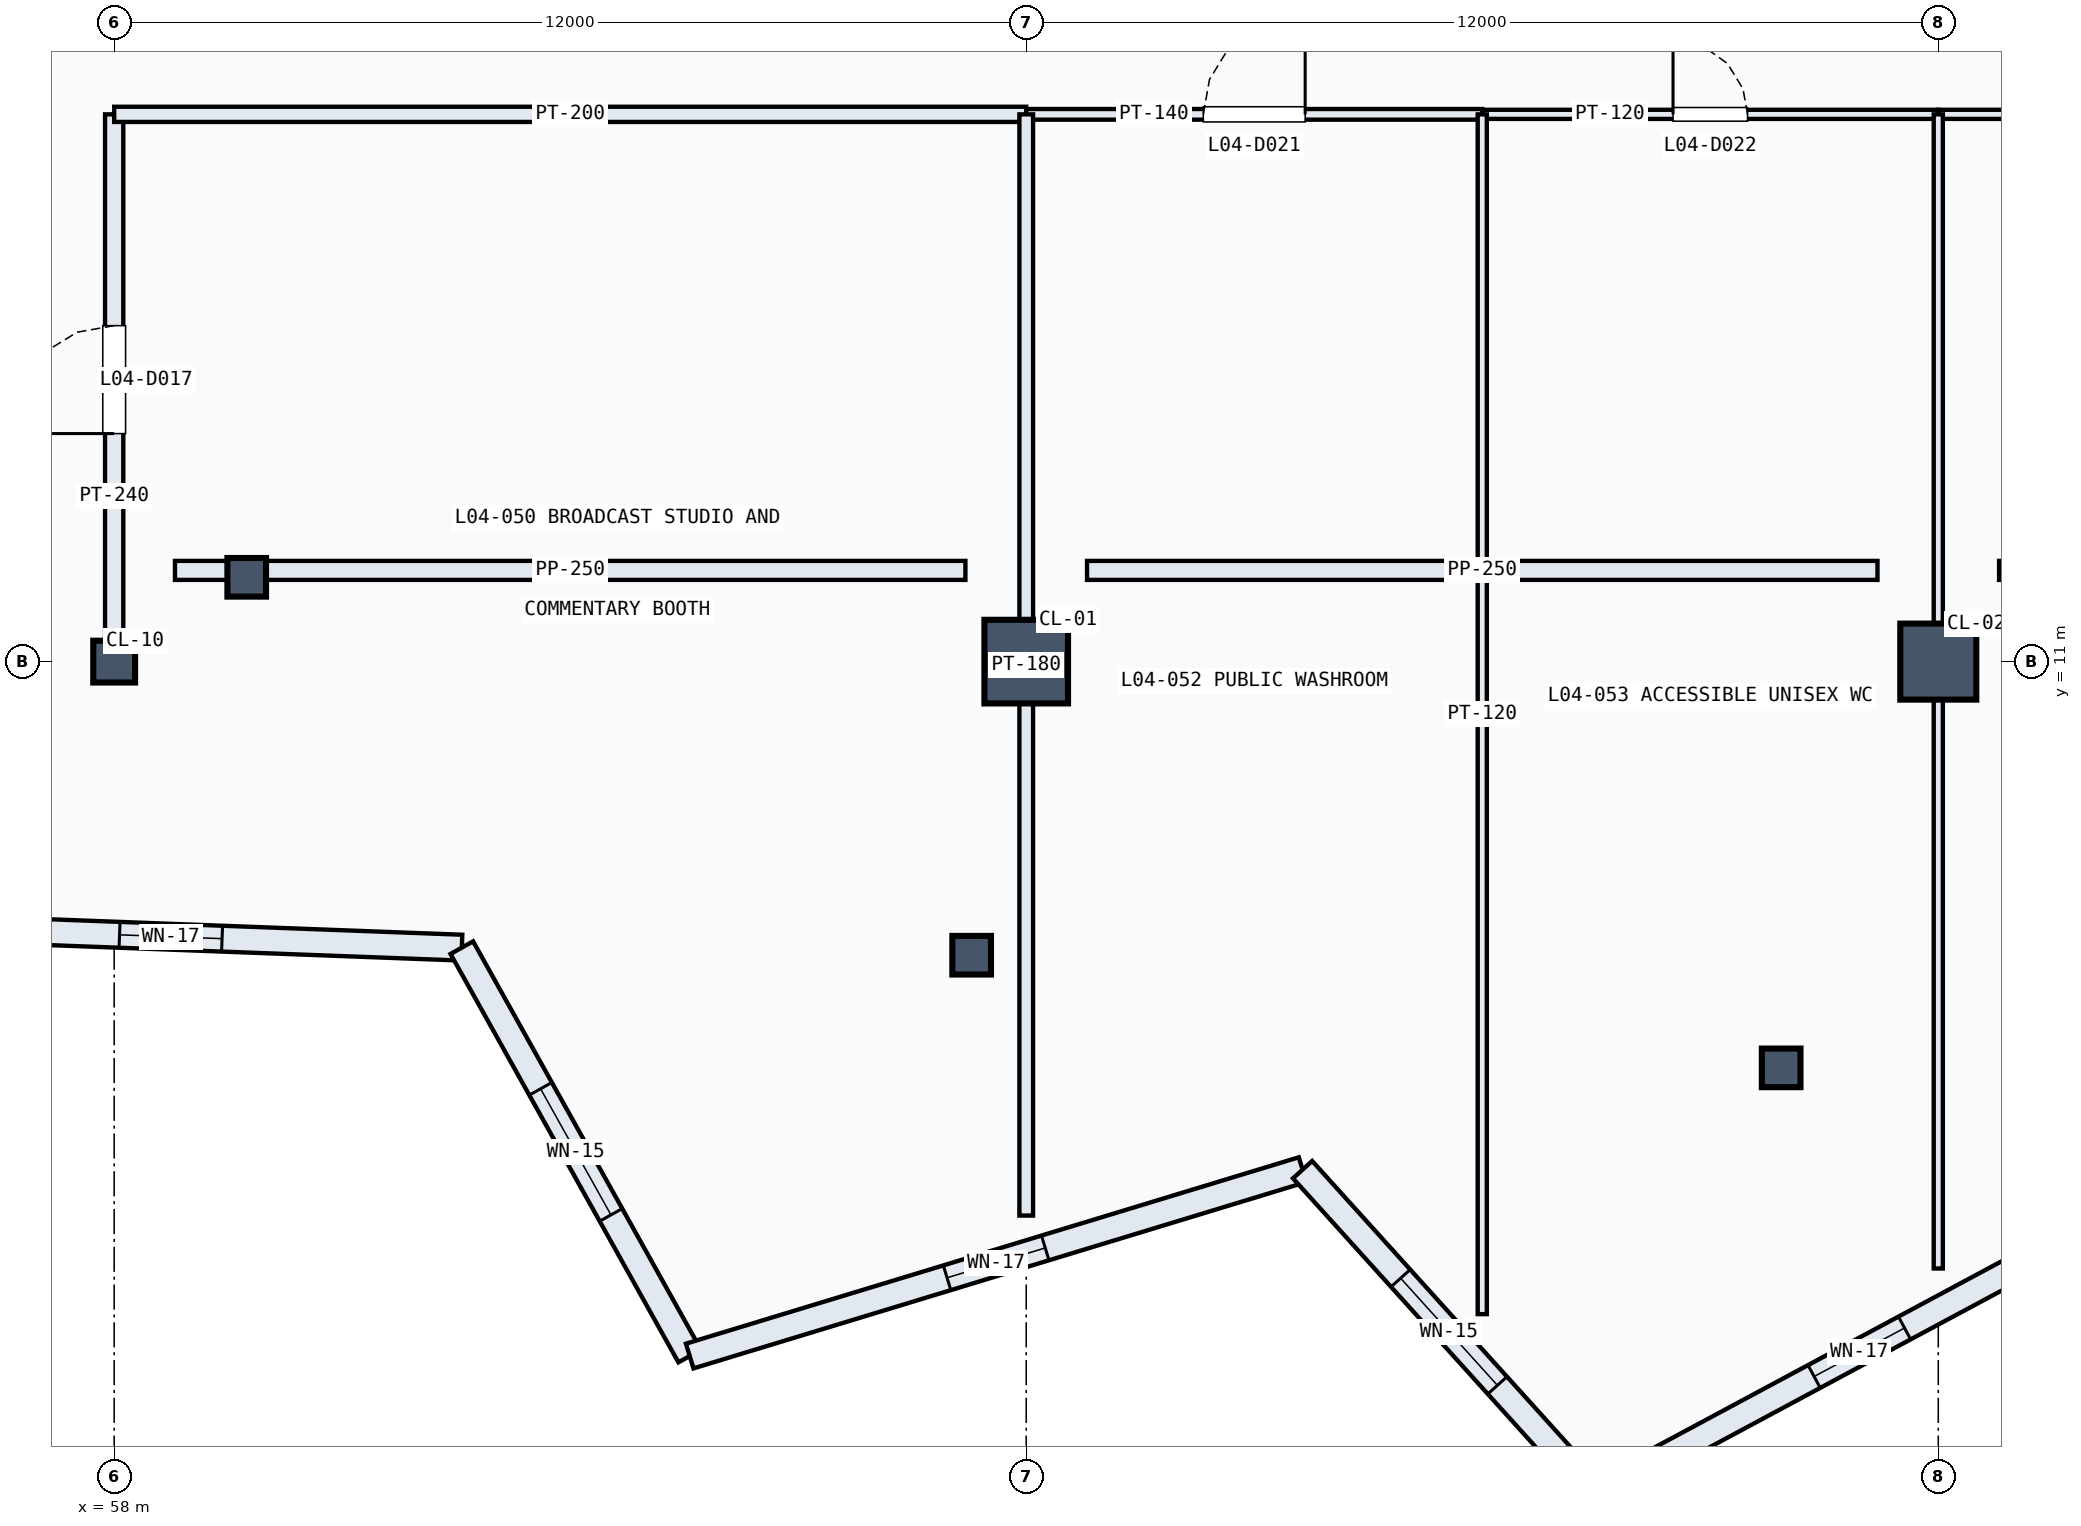
"""IFC4 building model, lengths in metres.
Left out: names, types, materials, properties, quantities, classifications, styles, units other than length and angle.
Written with IfcOpenShell. Run it as: python <this file> out.ifc"""

import sys

from ifc_helpers import new_model, si_unit, direction, frame, frame_2d, origin, origin_2d, place, context, subcontext, project, spatial, rectangle, hollow_circle, extrude, element, fill, save


model = new_model("IFC4")
c1 = context("Model", 3, precision=1e-05, world=origin(), true_north=direction((0.0, 1.0)))
c2 = subcontext(c1, "Body", "Model", "MODEL_VIEW")
j1 = project(units=[si_unit("LENGTHUNIT", "METRE"), si_unit("PLANEANGLEUNIT", "RADIAN")], contexts=[c1])
p1 = place(None, origin())
s1 = spatial("IfcSite", under=j1, at=p1, CompositionType="ELEMENT")
p2 = place(p1, origin())
s2 = spatial("IfcBuilding", under=s1, at=p2, CompositionType="ELEMENT")
p3 = place(p2, frame((0.0, 0.0, 19.5)))
s3 = spatial("IfcBuildingStorey", under=s2, at=p3, CompositionType="ELEMENT", Elevation=19.5)
p4 = place(p3, frame((58.0, 11.0, 0.0), z_axis=(0.0, 0.0, 1.0), x_axis=(1.0, 0.0, 0.0)))
e1 = element("IfcColumn", 1, at=p4, inside=s3, PredefinedType="COLUMN", context=c2, shape_type="SweptSolid", body=[
    extrude(rectangle(XDim=0.55, YDim=0.55, at=origin_2d()), origin(), (0.0, 0.0, 1.0), 4.8),
])
p5 = place(p3, frame((70.0, 11.0, 0.0), z_axis=(0.0, 0.0, 1.0), x_axis=(1.0, 0.0, 0.0)))
e2 = element("IfcColumn", 2, at=p5, inside=s3, PredefinedType="COLUMN", context=c2, shape_type="SweptSolid", body=[
    extrude(rectangle(XDim=1.1, YDim=1.1, at=origin_2d()), origin(), (0.0, 0.0, 1.0), 4.8),
])
p6 = place(p3, frame((82.0, 11.0, 0.0), z_axis=(0.0, 0.0, 1.0), x_axis=(1.0, 0.0, 0.0)))
e3 = element("IfcColumn", 3, at=p6, inside=s3, PredefinedType="COLUMN", context=c2, shape_type="SweptSolid", body=[
    extrude(rectangle(XDim=1.0, YDim=1.0, at=origin_2d()), origin(), (0.0, 0.0, 1.0), 4.8),
])
for number, where, z_axis, x_axis in (
    (4, (59.744, 12.109, 0.0), (0.0, 0.0, 1.0), (1.0, 0.0, 0.0)),
    (5, (69.282, 7.137, 0.0), (0.0, 0.0, 1.0), (1.0, 0.0, 0.0)),
    (6, (79.933, 5.655, 0.0), (0.0, 0.0, 1.0), (1.0, 0.0, 0.0)),
):
    element("IfcColumn", number, at=place(p3, frame(where, z_axis=z_axis, x_axis=x_axis)), inside=s3, PredefinedType="COLUMN", context=c2, shape_type="SweptSolid", body=[
        extrude(hollow_circle(Radius=0.254, WallThickness=0.02, at=origin_2d()), origin(), (0.0, 0.0, 1.0), 4.8),
    ])
p7 = place(p3, frame((54.917, 7.524, 0.0), z_axis=(0.0, 0.0, 1.0), x_axis=(0.999297884119, -0.037466502319, 0.0)))
e7 = element("IfcWall", 7, at=p7, inside=s3, PredefinedType="USERDEFINED", context=c2, shape_type="SweptSolid", body=[
    extrude(rectangle(XDim=7.663, YDim=0.34, at=frame_2d((3.832, 0.0))), origin(), (0.0, 0.0, 1.0), 4.455),
])
p8 = place(p7, frame((3.156, 0.0, 0.8)))
e8 = element("IfcOpeningElement", 8, at=p8, cuts=e7, PredefinedType="OPENING", context=c2, shape_type="SweptSolid", body=[
    extrude(rectangle(XDim=1.35, YDim=2.1, at=frame_2d((0.675, 1.05))), frame((0.0, 0.18, 0.0), z_axis=(0.0, -1.0, 0.0), x_axis=(1.0, 0.0, 0.0)), (0.0, 0.0, 1.0), 0.36),
])
p9 = place(p3, frame((62.574, 7.237, 0.0), z_axis=(0.0, 0.0, 1.0), x_axis=(0.487306352228, -0.87323108, 0.0)))
e9 = element("IfcWall", 9, at=p9, inside=s3, PredefinedType="USERDEFINED", context=c2, shape_type="SweptSolid", body=[
    extrude(rectangle(XDim=6.153, YDim=0.34, at=frame_2d((3.076, 0.0))), origin(), (0.0, 0.0, 1.0), 4.455),
])
p10 = place(p9, frame((2.126, 0.0, 0.85)))
e10 = element("IfcOpeningElement", 10, at=p10, cuts=e9, PredefinedType="OPENING", context=c2, shape_type="SweptSolid", body=[
    extrude(rectangle(XDim=1.9, YDim=1.6, at=frame_2d((0.95, 0.8))), frame((0.0, 0.18, 0.0), z_axis=(0.0, -1.0, 0.0), x_axis=(1.0, 0.0, 0.0)), (0.0, 0.0, 1.0), 0.36),
])
p11 = place(p3, frame((65.573, 1.864, 0.0), z_axis=(0.0, 0.0, 1.0), x_axis=(0.956738407321, 0.290949514446, 0.0)))
e11 = element("IfcWall", 11, at=p11, inside=s3, PredefinedType="USERDEFINED", context=c2, shape_type="SweptSolid", body=[
    extrude(rectangle(XDim=8.428, YDim=0.34, at=frame_2d((4.214, 0.0))), origin(), (0.0, 0.0, 1.0), 4.455),
])
p12 = place(p11, frame((3.539, 0.0, 0.8)))
e12 = element("IfcOpeningElement", 12, at=p12, cuts=e11, PredefinedType="OPENING", context=c2, shape_type="SweptSolid", body=[
    extrude(rectangle(XDim=1.35, YDim=2.1, at=frame_2d((0.675, 1.05))), frame((0.0, 0.18, 0.0), z_axis=(0.0, -1.0, 0.0), x_axis=(1.0, 0.0, 0.0)), (0.0, 0.0, 1.0), 0.36),
])
p13 = place(p3, frame((73.636, 4.316, 0.0), z_axis=(0.0, 0.0, 1.0), x_axis=(0.670348131104, -0.742046752654, 0.0)))
e13 = element("IfcWall", 13, at=p13, inside=s3, PredefinedType="USERDEFINED", context=c2, shape_type="SweptSolid", body=[
    extrude(rectangle(XDim=5.748, YDim=0.34, at=frame_2d((2.874, 0.0))), origin(), (0.0, 0.0, 1.0), 4.455),
])
p14 = place(p13, frame((1.924, 0.0, 0.85)))
e14 = element("IfcOpeningElement", 14, at=p14, cuts=e13, PredefinedType="OPENING", context=c2, shape_type="SweptSolid", body=[
    extrude(rectangle(XDim=1.9, YDim=1.6, at=frame_2d((0.95, 0.8))), frame((0.0, 0.18, 0.0), z_axis=(0.0, -1.0, 0.0), x_axis=(1.0, 0.0, 0.0)), (0.0, 0.0, 1.0), 0.36),
])
p15 = place(p3, frame((77.489, 0.051, 0.0), z_axis=(0.0, 0.0, 1.0), x_axis=(0.881201188687, 0.472741435731, 0.0)))
e15 = element("IfcWall", 15, at=p15, inside=s3, PredefinedType="USERDEFINED", context=c2, shape_type="SweptSolid", body=[
    extrude(rectangle(XDim=7.881, YDim=0.34, at=frame_2d((3.94, 0.0))), origin(), (0.0, 0.0, 1.0), 4.455),
])
p16 = place(p15, frame((3.265, 0.0, 0.8)))
e16 = element("IfcOpeningElement", 16, at=p16, cuts=e15, PredefinedType="OPENING", context=c2, shape_type="SweptSolid", body=[
    extrude(rectangle(XDim=1.35, YDim=2.1, at=frame_2d((0.675, 1.05))), frame((0.0, 0.18, 0.0), z_axis=(0.0, -1.0, 0.0), x_axis=(1.0, 0.0, 0.0)), (0.0, 0.0, 1.0), 0.36),
])
for number, where, z_axis, x_axis in (
    (17, (58.8, 12.2, 0.0), (0.0, 0.0, 1.0), (1.0, 0.0, 0.0)),
    (18, (70.8, 12.2, 0.0), (0.0, 0.0, 1.0), (1.0, 0.0, 0.0)),
    (19, (82.8, 12.2, 0.0), (0.0, 0.0, 1.0), (1.0, 0.0, 0.0)),
):
    element("IfcWall", number, at=place(p3, frame(where, z_axis=z_axis, x_axis=x_axis)), inside=s3, PredefinedType="PARAPET", context=c2, shape_type="SweptSolid", body=[
        extrude(rectangle(XDim=10.4, YDim=0.25, at=frame_2d((5.2, 0.0))), origin(), (0.0, 0.0, 1.0), 0.8),
    ])
p17 = place(p3, frame((58.0, 11.22, 0.0), z_axis=(0.0, 0.0, 1.0), x_axis=(0.0, 1.0, 0.0)))
e20 = element("IfcWall", 20, at=p17, inside=s3, PredefinedType="PARTITIONING", context=c2, shape_type="SweptSolid", body=[
    extrude(rectangle(XDim=6.98, YDim=0.24, at=frame_2d((3.49, 0.0))), origin(), (0.0, 0.0, 1.0), 3.79),
])
p18 = place(p17, frame((2.78, 0.0, 0.0)))
e21 = element("IfcOpeningElement", 21, at=p18, cuts=e20, PredefinedType="OPENING", context=c2, shape_type="SweptSolid", body=[
    extrude(rectangle(XDim=1.42, YDim=2.25, at=frame_2d((0.71, 1.125))), frame((0.0, 0.13, 0.0), z_axis=(0.0, -1.0, 0.0), x_axis=(1.0, 0.0, 0.0)), (0.0, 0.0, 1.0), 0.26),
])
p19 = place(p3, frame((58.0, 18.2, 0.0), z_axis=(0.0, 0.0, 1.0), x_axis=(1.0, 0.0, 0.0)))
e22 = element("IfcWall", 22, at=p19, inside=s3, PredefinedType="PARTITIONING", context=c2, shape_type="SweptSolid", body=[
    extrude(rectangle(XDim=12.0, YDim=0.2, at=frame_2d((6.0, 0.0))), origin(), (0.0, 0.0, 1.0), 3.49),
])
p20 = place(p3, frame((70.0, 18.2, 0.0), z_axis=(0.0, 0.0, 1.0), x_axis=(1.0, 0.0, 0.0)))
e23 = element("IfcWall", 23, at=p20, inside=s3, PredefinedType="PARTITIONING", context=c2, shape_type="SweptSolid", body=[
    extrude(rectangle(XDim=6.0, YDim=0.14, at=frame_2d((3.0, 0.0))), origin(), (0.0, 0.0, 1.0), 3.49),
])
p21 = place(p20, frame((2.33, 0.0, 0.0)))
e24 = element("IfcOpeningElement", 24, at=p21, cuts=e23, PredefinedType="OPENING", context=c2, shape_type="SweptSolid", body=[
    extrude(rectangle(XDim=1.34, YDim=2.15, at=frame_2d((0.67, 1.075))), frame((0.0, 0.08, 0.0), z_axis=(0.0, -1.0, 0.0), x_axis=(1.0, 0.0, 0.0)), (0.0, 0.0, 1.0), 0.16),
])
p22 = place(p3, frame((76.0, 18.2, 0.0), z_axis=(0.0, 0.0, 1.0), x_axis=(1.0, 0.0, 0.0)))
e25 = element("IfcWall", 25, at=p22, inside=s3, PredefinedType="PARTITIONING", context=c2, shape_type="SweptSolid", body=[
    extrude(rectangle(XDim=6.0, YDim=0.12, at=frame_2d((3.0, 0.0))), origin(), (0.0, 0.0, 1.0), 3.64),
])
p23 = place(p22, frame((2.51, 0.0, 0.0)))
e26 = element("IfcOpeningElement", 26, at=p23, cuts=e25, PredefinedType="OPENING", context=c2, shape_type="SweptSolid", body=[
    extrude(rectangle(XDim=0.98, YDim=2.1, at=frame_2d((0.49, 1.05))), frame((0.0, 0.07, 0.0), z_axis=(0.0, -1.0, 0.0), x_axis=(1.0, 0.0, 0.0)), (0.0, 0.0, 1.0), 0.14),
])
p24 = place(p3, frame((82.0, 18.2, 0.0), z_axis=(0.0, 0.0, 1.0), x_axis=(1.0, 0.0, 0.0)))
e27 = element("IfcWall", 27, at=p24, inside=s3, PredefinedType="PARTITIONING", context=c2, shape_type="SweptSolid", body=[
    extrude(rectangle(XDim=12.0, YDim=0.12, at=frame_2d((6.0, 0.0))), origin(), (0.0, 0.0, 1.0), 3.64),
])
p25 = place(p24, frame((5.41, 0.0, 0.0)))
e28 = element("IfcOpeningElement", 28, at=p25, cuts=e27, PredefinedType="OPENING", context=c2, shape_type="SweptSolid", body=[
    extrude(rectangle(XDim=1.18, YDim=2.15, at=frame_2d((0.59, 1.075))), frame((0.0, 0.07, 0.0), z_axis=(0.0, -1.0, 0.0), x_axis=(1.0, 0.0, 0.0)), (0.0, 0.0, 1.0), 0.14),
])
p26 = place(p3, frame((70.0, 3.712, 0.0), z_axis=(0.0, 0.0, 1.0), x_axis=(0.0, 1.0, 0.0)))
e29 = element("IfcWall", 29, at=p26, inside=s3, PredefinedType="PARTITIONING", context=c2, shape_type="SweptSolid", body=[
    extrude(rectangle(XDim=14.488, YDim=0.18, at=frame_2d((7.244, 0.0))), origin(), (0.0, 0.0, 1.0), 3.49),
])
p27 = place(p3, frame((76.0, 2.415, 0.0), z_axis=(0.0, 0.0, 1.0), x_axis=(0.0, 1.0, 0.0)))
e30 = element("IfcWall", 30, at=p27, inside=s3, PredefinedType="PARTITIONING", context=c2, shape_type="SweptSolid", body=[
    extrude(rectangle(XDim=15.785, YDim=0.12, at=frame_2d((7.892, 0.0))), origin(), (0.0, 0.0, 1.0), 3.853),
])
p28 = place(p3, frame((82.0, 3.016, 0.0), z_axis=(0.0, 0.0, 1.0), x_axis=(0.0, 1.0, 0.0)))
e31 = element("IfcWall", 31, at=p28, inside=s3, PredefinedType="PARTITIONING", context=c2, shape_type="SweptSolid", body=[
    extrude(rectangle(XDim=15.184, YDim=0.12, at=frame_2d((7.592, 0.0))), origin(), (0.0, 0.0, 1.0), 3.64),
])
p29 = place(p8, origin())
e32 = element("IfcWindow", 32, at=p29, inside=s3, PartitioningType="SINGLE_PANEL", PredefinedType="WINDOW", context=c2, shape_type="SweptSolid", body=[
    extrude(rectangle(XDim=1.35, YDim=2.1, at=frame_2d((0.675, 1.05))), frame((0.0, 0.03, 0.0), z_axis=(0.0, -1.0, 0.0), x_axis=(1.0, 0.0, 0.0)), (0.0, 0.0, 1.0), 0.06),
])
fill(e8, e32)
p30 = place(p10, origin())
e33 = element("IfcWindow", 33, at=p30, inside=s3, PartitioningType="SINGLE_PANEL", PredefinedType="WINDOW", context=c2, shape_type="SweptSolid", body=[
    extrude(rectangle(XDim=1.9, YDim=1.6, at=frame_2d((0.95, 0.8))), frame((0.0, 0.03, 0.0), z_axis=(0.0, -1.0, 0.0), x_axis=(1.0, 0.0, 0.0)), (0.0, 0.0, 1.0), 0.06),
])
fill(e10, e33)
p31 = place(p12, origin())
e34 = element("IfcWindow", 34, at=p31, inside=s3, PartitioningType="SINGLE_PANEL", PredefinedType="WINDOW", context=c2, shape_type="SweptSolid", body=[
    extrude(rectangle(XDim=1.35, YDim=2.1, at=frame_2d((0.675, 1.05))), frame((0.0, 0.03, 0.0), z_axis=(0.0, -1.0, 0.0), x_axis=(1.0, 0.0, 0.0)), (0.0, 0.0, 1.0), 0.06),
])
fill(e12, e34)
p32 = place(p14, origin())
e35 = element("IfcWindow", 35, at=p32, inside=s3, PartitioningType="SINGLE_PANEL", PredefinedType="WINDOW", context=c2, shape_type="SweptSolid", body=[
    extrude(rectangle(XDim=1.9, YDim=1.6, at=frame_2d((0.95, 0.8))), frame((0.0, 0.03, 0.0), z_axis=(0.0, -1.0, 0.0), x_axis=(1.0, 0.0, 0.0)), (0.0, 0.0, 1.0), 0.06),
])
fill(e14, e35)
p33 = place(p16, origin())
e36 = element("IfcWindow", 36, at=p33, inside=s3, PartitioningType="SINGLE_PANEL", PredefinedType="WINDOW", context=c2, shape_type="SweptSolid", body=[
    extrude(rectangle(XDim=1.35, YDim=2.1, at=frame_2d((0.675, 1.05))), frame((0.0, 0.03, 0.0), z_axis=(0.0, -1.0, 0.0), x_axis=(1.0, 0.0, 0.0)), (0.0, 0.0, 1.0), 0.06),
])
fill(e16, e36)
p34 = place(p18, origin())
e37 = element("IfcDoor", 37, at=p34, inside=s3, OperationType="SINGLE_SWING_LEFT", PredefinedType="DOOR", context=c2, shape_type="SweptSolid", body=[
    extrude(rectangle(XDim=1.42, YDim=2.25, at=frame_2d((0.71, 1.125))), frame((0.0, 0.025, 0.0), z_axis=(0.0, -1.0, 0.0), x_axis=(1.0, 0.0, 0.0)), (0.0, 0.0, 1.0), 0.05),
])
fill(e21, e37)
p35 = place(p21, origin())
e38 = element("IfcDoor", 38, at=p35, inside=s3, OperationType="SINGLE_SWING_RIGHT", PredefinedType="DOOR", context=c2, shape_type="SweptSolid", body=[
    extrude(rectangle(XDim=1.34, YDim=2.15, at=frame_2d((0.67, 1.075))), frame((0.0, 0.025, 0.0), z_axis=(0.0, -1.0, 0.0), x_axis=(1.0, 0.0, 0.0)), (0.0, 0.0, 1.0), 0.05),
])
fill(e24, e38)
p36 = place(p23, origin())
e39 = element("IfcDoor", 39, at=p36, inside=s3, OperationType="SINGLE_SWING_LEFT", PredefinedType="DOOR", context=c2, shape_type="SweptSolid", body=[
    extrude(rectangle(XDim=0.98, YDim=2.1, at=frame_2d((0.49, 1.05))), frame((0.0, 0.025, 0.0), z_axis=(0.0, -1.0, 0.0), x_axis=(1.0, 0.0, 0.0)), (0.0, 0.0, 1.0), 0.05),
])
fill(e26, e39)
save(model, sys.argv[1])
